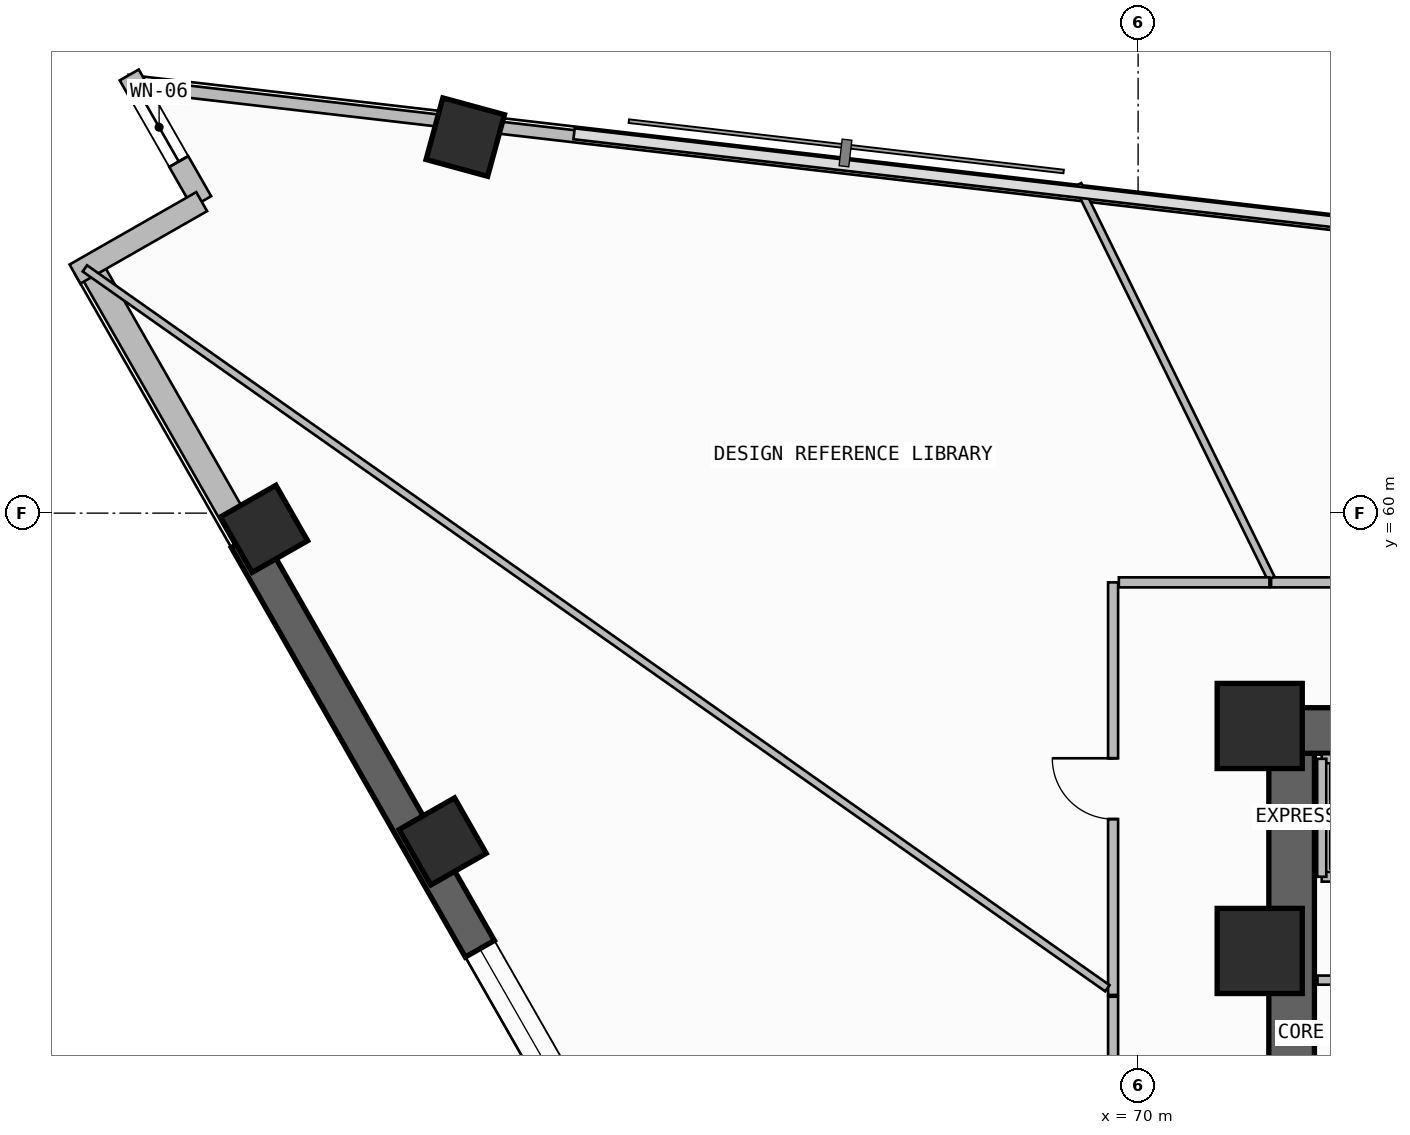
"""IFC4 building model, lengths in metres.
Left out: names, types, materials, properties, quantities, classifications, styles, units other than length and angle.
Written with IfcOpenShell. Run it as: python <this file> out.ifc"""

import sys

from ifc_helpers import new_model, si_unit, direction, frame, frame_2d, origin, origin_2d, place, context, subcontext, project, spatial, rectangle, extrude, element, fill, save


model = new_model("IFC4")
c1 = context("Model", 3, precision=1e-05, world=origin(), true_north=direction((0.0, 1.0)))
c2 = subcontext(c1, "Body", "Model", "MODEL_VIEW")
j1 = project(units=[si_unit("LENGTHUNIT", "METRE"), si_unit("PLANEANGLEUNIT", "RADIAN")], contexts=[c1])
p1 = place(None, origin())
s1 = spatial("IfcSite", under=j1, at=p1, CompositionType="ELEMENT")
p2 = place(p1, origin())
s2 = spatial("IfcBuilding", under=s1, at=p2, CompositionType="ELEMENT")
p3 = place(p2, frame((0.0, 0.0, 214.98)))
s3 = spatial("IfcBuildingStorey", under=s2, at=p3, CompositionType="ELEMENT", Elevation=214.98)
p4 = place(p3, frame((72.525, 43.35, -0.26), z_axis=(0.0, 0.0, 1.0), x_axis=(0.0, 1.0, 0.0)))
e1 = element("IfcWall", 1, at=p4, inside=s3, PredefinedType="SHEAR", context=c2, shape_type="SweptSolid", body=[
    extrude(rectangle(XDim=12.7, YDim=0.75, at=frame_2d((6.35, 0.0))), origin(), (0.0, 0.0, 1.0), 3.52),
])
p5 = place(p4, frame((1.35, 0.0, 0.26)))
e2 = element("IfcOpeningElement", 2, at=p5, cuts=e1, PredefinedType="OPENING", context=c2, shape_type="SweptSolid", body=[
    extrude(rectangle(XDim=1.2, YDim=2.2, at=frame_2d((0.6, 1.1))), frame((0.0, 0.385, 0.0), z_axis=(0.0, -1.0, 0.0), x_axis=(1.0, 0.0, 0.0)), (0.0, 0.0, 1.0), 0.77),
])
p6 = place(p3, frame((72.0, 56.425, -0.26), z_axis=(0.0, 0.0, 1.0), x_axis=(1.0, 0.0, 0.0)))
e3 = element("IfcWall", 3, at=p6, inside=s3, PredefinedType="SHEAR", context=c2, shape_type="SweptSolid", body=[
    extrude(rectangle(XDim=13.75, YDim=0.75, at=frame_2d((6.875, 0.0))), origin(), (0.0, 0.0, 1.0), 3.52),
])
for number, where, z_axis, x_axis in (
    (4, (72.0, 52.8, 0.0), (0.0, 0.0, 1.0), (1.0, 0.0, 0.0)),
    (5, (72.0, 56.5, 0.0), (0.0, 0.0, 1.0), (1.0, 0.0, 0.0)),
):
    element("IfcColumn", number, at=place(p3, frame(where, z_axis=z_axis, x_axis=x_axis)), inside=s3, PredefinedType="COLUMN", context=c2, shape_type="SweptSolid", body=[
        extrude(rectangle(XDim=1.4, YDim=1.4, at=origin_2d()), origin(), (0.0, 0.0, 1.0), 3.52),
    ])
for number, where, z_axis, x_axis in (
    (6, (58.934, 66.184, 0.0), (0.0, 0.0, 1.0), (0.263, 0.965, 0.0)),
    (7, (55.625, 59.742, 0.0), (0.0, 0.0, 1.0), (-0.496, 0.868, 0.0)),
    (8, (58.563, 54.601, 0.0), (0.0, 0.0, 1.0), (-0.496, 0.868, 0.0)),
):
    element("IfcColumn", number, at=place(p3, frame(where, z_axis=z_axis, x_axis=x_axis)), inside=s3, PredefinedType="COLUMN", context=c2, shape_type="SweptSolid", body=[
        extrude(rectangle(XDim=1.05, YDim=1.05, at=origin_2d()), origin(), (0.0, 0.0, 1.0), 3.52),
    ])
p7 = place(p3, frame((52.754, 64.068, 0.0), z_axis=(0.0, 0.0, 1.0), x_axis=(0.496209984367, -0.868202540548, 0.0)))
e9 = element("IfcWall", 9, at=p7, inside=s3, PredefinedType="SOLIDWALL", context=c2, shape_type="SweptSolid", body=[
    extrude(rectangle(XDim=5.181, YDim=0.42, at=frame_2d((2.59, 0.0))), origin(), (0.0, 0.0, 1.0), 2.645),
])
p8 = place(p3, frame((55.325, 59.57, -0.26), z_axis=(0.0, 0.0, 1.0), x_axis=(0.496211351597, -0.868201759124, 0.0)))
e10 = element("IfcWall", 10, at=p8, inside=s3, PredefinedType="SHEAR", context=c2, shape_type="SweptSolid", body=[
    extrude(rectangle(XDim=19.243, YDim=0.55, at=frame_2d((9.622, 0.0))), origin(), (0.0, 0.0, 1.0), 3.52),
])
p9 = place(p8, frame((7.757, 0.0, 1.1)))
e11 = element("IfcOpeningElement", 11, at=p9, cuts=e10, PredefinedType="OPENING", context=c2, shape_type="SweptSolid", body=[
    extrude(rectangle(XDim=2.4, YDim=1.2, at=frame_2d((1.2, 0.6))), frame((0.0, 0.285, 0.0), z_axis=(0.0, -1.0, 0.0), x_axis=(1.0, 0.0, 0.0)), (0.0, 0.0, 1.0), 0.57),
])
p10 = place(p3, frame((53.408, 67.206, 0.0), z_axis=(0.0, 0.0, 1.0), x_axis=(0.496292324652, -0.868155474838, 0.0)))
e12 = element("IfcWall", 12, at=p10, inside=s3, PredefinedType="SOLIDWALL", context=c2, shape_type="SweptSolid", body=[
    extrude(rectangle(XDim=2.4, YDim=0.36, at=frame_2d((1.2, 0.0))), origin(), (0.0, 0.0, 1.0), 3.26),
])
p11 = place(p10, frame((0.34, 0.0, 0.45)))
e13 = element("IfcOpeningElement", 13, at=p11, cuts=e12, PredefinedType="OPENING", context=c2, shape_type="SweptSolid", body=[
    extrude(rectangle(XDim=1.3, YDim=2.4, at=frame_2d((0.65, 1.2))), frame((0.0, 0.19, 0.0), z_axis=(0.0, -1.0, 0.0), x_axis=(1.0, 0.0, 0.0)), (0.0, 0.0, 1.0), 0.38),
])
p12 = place(p3, frame((54.599, 65.123, 0.0), z_axis=(0.0, 0.0, 1.0), x_axis=(-0.86818053093, -0.4962484919, 0.0)))
e14 = element("IfcWall", 14, at=p12, inside=s3, PredefinedType="SOLIDWALL", context=c2, shape_type="SweptSolid", body=[
    extrude(rectangle(XDim=2.4, YDim=0.36, at=frame_2d((1.2, 0.0))), origin(), (0.0, 0.0, 1.0), 3.26),
])
p13 = place(p3, frame((85.424, 63.338, 0.0), z_axis=(0.0, 0.0, 1.0), x_axis=(-0.993364714048, 0.115006716693, 0.0)))
e15 = element("IfcWall", 15, at=p13, inside=s3, PredefinedType="PARAPET", context=c2, shape_type="SweptSolid", body=[
    extrude(rectangle(XDim=26.302, YDim=0.2, at=frame_2d((13.151, 0.0))), origin(), (0.0, 0.0, 1.0), 1.15),
])
p14 = place(p3, frame((58.622, 66.441, 0.0), z_axis=(0.0, 0.0, 1.0), x_axis=(-0.993362937665, 0.115022059074, 0.0)))
e16 = element("IfcWall", 16, at=p14, inside=s3, PredefinedType="PARAPET", context=c2, shape_type="SweptSolid", body=[
    extrude(rectangle(XDim=4.727, YDim=0.2, at=frame_2d((2.364, 0.0))), origin(), (0.0, 0.0, 1.0), 1.15),
])
p15 = place(p3, frame((72.95, 52.32, 0.0), z_axis=(0.0, 0.0, 1.0), x_axis=(1.0, 0.0, 0.0)))
e17 = element("IfcWall", 17, at=p15, inside=s3, PredefinedType="SOLIDWALL", context=c2, shape_type="SweptSolid", body=[
    extrude(rectangle(XDim=3.33, YDim=0.15, at=frame_2d((1.665, 0.0))), origin(), (0.0, 0.0, 1.0), 3.26),
])
p16 = place(p3, frame((73.02, 54.02, 0.0), z_axis=(0.0, 0.0, 1.0), x_axis=(1.0, 0.0, 0.0)))
e18 = element("IfcWall", 18, at=p16, inside=s3, PredefinedType="SOLIDWALL", context=c2, shape_type="SweptSolid", body=[
    extrude(rectangle(XDim=12.08, YDim=0.16, at=frame_2d((6.04, 0.0))), origin(), (0.0, 0.0, 1.0), 3.26),
])
p17 = place(p16, frame((4.03, 0.0, 0.0)))
e19 = element("IfcOpeningElement", 19, at=p17, cuts=e18, PredefinedType="OPENING", context=c2, shape_type="SweptSolid", body=[
    extrude(rectangle(XDim=1.1, YDim=2.25, at=frame_2d((0.55, 1.125))), frame((0.0, 0.09, 0.0), z_axis=(0.0, -1.0, 0.0), x_axis=(1.0, 0.0, 0.0)), (0.0, 0.0, 1.0), 0.18),
])
p18 = place(p16, frame((6.28, 0.0, 0.0)))
e20 = element("IfcOpeningElement", 20, at=p18, cuts=e18, PredefinedType="OPENING", context=c2, shape_type="SweptSolid", body=[
    extrude(rectangle(XDim=1.1, YDim=2.25, at=frame_2d((0.55, 1.125))), frame((0.0, 0.09, 0.0), z_axis=(0.0, -1.0, 0.0), x_axis=(1.0, 0.0, 0.0)), (0.0, 0.0, 1.0), 0.18),
])
p19 = place(p16, frame((8.53, 0.0, 0.0)))
e21 = element("IfcOpeningElement", 21, at=p19, cuts=e18, PredefinedType="OPENING", context=c2, shape_type="SweptSolid", body=[
    extrude(rectangle(XDim=1.1, YDim=2.25, at=frame_2d((0.55, 1.125))), frame((0.0, 0.09, 0.0), z_axis=(0.0, -1.0, 0.0), x_axis=(1.0, 0.0, 0.0)), (0.0, 0.0, 1.0), 0.18),
])
p20 = place(p3, frame((73.02, 55.96, 0.0), z_axis=(0.0, 0.0, 1.0), x_axis=(1.0, 0.0, 0.0)))
e22 = element("IfcWall", 22, at=p20, inside=s3, PredefinedType="SOLIDWALL", context=c2, shape_type="SweptSolid", body=[
    extrude(rectangle(XDim=3.5, YDim=0.15, at=frame_2d((1.75, 0.0))), origin(), (0.0, 0.0, 1.0), 3.26),
])
p21 = place(p3, frame((73.02, 54.02, 0.0), z_axis=(0.0, 0.0, 1.0), x_axis=(0.0, 1.0, 0.0)))
e23 = element("IfcWall", 23, at=p21, inside=s3, PredefinedType="PLUMBINGWALL", context=c2, shape_type="SweptSolid", body=[
    extrude(rectangle(XDim=1.94, YDim=0.15, at=frame_2d((0.97, 0.0))), origin(), (0.0, 0.0, 1.0), 3.26),
])
p22 = place(p3, frame((77.35, 58.861, 0.0), z_axis=(0.0, 0.0, 1.0), x_axis=(-1.0, 0.0, 0.0)))
e24 = element("IfcWall", 24, at=p22, inside=s3, PredefinedType="PARTITIONING", context=c2, shape_type="SweptSolid", body=[
    extrude(rectangle(XDim=5.163, YDim=0.165, at=frame_2d((2.582, 0.0))), origin(), (0.0, 0.0, 1.0), 3.26),
])
p23 = place(p22, frame((2.081, 0.0, 0.0)))
e25 = element("IfcOpeningElement", 25, at=p23, cuts=e24, PredefinedType="OPENING", context=c2, shape_type="SweptSolid", body=[
    extrude(rectangle(XDim=1.0, YDim=2.2, at=frame_2d((0.5, 1.1))), frame((0.0, 0.093, 0.0), z_axis=(0.0, -1.0, 0.0), x_axis=(1.0, 0.0, 0.0)), (0.0, 0.0, 1.0), 0.185),
])
p24 = place(p3, frame((72.187, 58.929, 0.0), z_axis=(0.0, 0.0, 1.0), x_axis=(-0.440808632893, 0.897601108047, 0.0)))
e26 = element("IfcWall", 26, at=p24, inside=s3, PredefinedType="PARTITIONING", context=c2, shape_type="SweptSolid", body=[
    extrude(rectangle(XDim=7.209, YDim=0.125, at=frame_2d((3.605, 0.0))), origin(), (0.0, 0.0, 1.0), 3.26),
])
p25 = place(p3, frame((69.589, 58.861, 0.0), z_axis=(0.0, 0.0, 1.0), x_axis=(0.0, -1.0, 0.0)))
e27 = element("IfcWall", 27, at=p25, inside=s3, PredefinedType="PARTITIONING", context=c2, shape_type="SweptSolid", body=[
    extrude(rectangle(XDim=6.785, YDim=0.165, at=frame_2d((3.393, 0.0))), origin(), (0.0, 0.0, 1.0), 2.745),
])
p26 = place(p25, frame((2.893, 0.0, 0.0)))
e28 = element("IfcOpeningElement", 28, at=p26, cuts=e27, PredefinedType="OPENING", context=c2, shape_type="SweptSolid", body=[
    extrude(rectangle(XDim=1.0, YDim=2.2, at=frame_2d((0.5, 1.1))), frame((0.0, 0.093, 0.0), z_axis=(0.0, -1.0, 0.0), x_axis=(1.0, 0.0, 0.0)), (0.0, 0.0, 1.0), 0.185),
])
p27 = place(p3, frame((72.16, 58.861, 0.0), z_axis=(0.0, 0.0, 1.0), x_axis=(-1.0, 0.0, 0.0)))
e29 = element("IfcWall", 29, at=p27, inside=s3, PredefinedType="PARTITIONING", context=c2, shape_type="SweptSolid", body=[
    extrude(rectangle(XDim=2.477, YDim=0.165, at=frame_2d((1.239, 0.0))), origin(), (0.0, 0.0, 1.0), 3.26),
])
p28 = place(p3, frame((69.494, 52.187, 0.0), z_axis=(0.0, 0.0, 1.0), x_axis=(-0.817704178427, 0.575638668422, 0.0)))
e30 = element("IfcWall", 30, at=p28, inside=s3, PredefinedType="PARTITIONING", context=c2, shape_type="SweptSolid", body=[
    extrude(rectangle(XDim=20.565, YDim=0.125, at=frame_2d((10.282, 0.0))), origin(), (0.0, 0.0, 1.0), 2.645),
])
p29 = place(p3, frame((69.589, 52.047, 0.0), z_axis=(0.0, 0.0, 1.0), x_axis=(0.0, -1.0, 0.0)))
e31 = element("IfcWall", 31, at=p29, inside=s3, PredefinedType="PARTITIONING", context=c2, shape_type="SweptSolid", body=[
    extrude(rectangle(XDim=8.452, YDim=0.165, at=frame_2d((4.226, 0.0))), origin(), (0.0, 0.0, 1.0), 2.745),
])
p30 = place(p29, frame((3.726, 0.0, 0.0)))
e32 = element("IfcOpeningElement", 32, at=p30, cuts=e31, PredefinedType="OPENING", context=c2, shape_type="SweptSolid", body=[
    extrude(rectangle(XDim=1.0, YDim=2.2, at=frame_2d((0.5, 1.1))), frame((0.0, 0.093, 0.0), z_axis=(0.0, -1.0, 0.0), x_axis=(1.0, 0.0, 0.0)), (0.0, 0.0, 1.0), 0.185),
])
p31 = place(p9, origin())
e33 = element("IfcWindow", 33, at=p31, inside=s3, PartitioningType="SINGLE_PANEL", PredefinedType="WINDOW", context=c2, shape_type="SweptSolid", body=[
    extrude(rectangle(XDim=2.4, YDim=1.2, at=frame_2d((1.2, 0.6))), frame((0.0, 0.03, 0.0), z_axis=(0.0, -1.0, 0.0), x_axis=(1.0, 0.0, 0.0)), (0.0, 0.0, 1.0), 0.06),
])
fill(e11, e33)
p32 = place(p11, origin())
e34 = element("IfcWindow", 34, at=p32, inside=s3, PartitioningType="SINGLE_PANEL", PredefinedType="WINDOW", context=c2, shape_type="SweptSolid", body=[
    extrude(rectangle(XDim=1.3, YDim=2.4, at=frame_2d((0.65, 1.2))), frame((0.0, 0.03, 0.0), z_axis=(0.0, -1.0, 0.0), x_axis=(1.0, 0.0, 0.0)), (0.0, 0.0, 1.0), 0.06),
])
fill(e13, e34)
p33 = place(p26, frame((1.0, 0.0, 0.0), z_axis=(0.0, 0.0, 1.0), x_axis=(-1.0, 0.0, 0.0)))
e35 = element("IfcDoor", 35, at=p33, inside=s3, OperationType="SINGLE_SWING_RIGHT", PredefinedType="DOOR", context=c2, shape_type="SweptSolid", body=[
    extrude(rectangle(XDim=1.0, YDim=2.2, at=frame_2d((0.5, 1.1))), frame((0.0, 0.025, 0.0), z_axis=(0.0, -1.0, 0.0), x_axis=(1.0, 0.0, 0.0)), (0.0, 0.0, 1.0), 0.05),
])
fill(e28, e35)
save(model, sys.argv[1])
